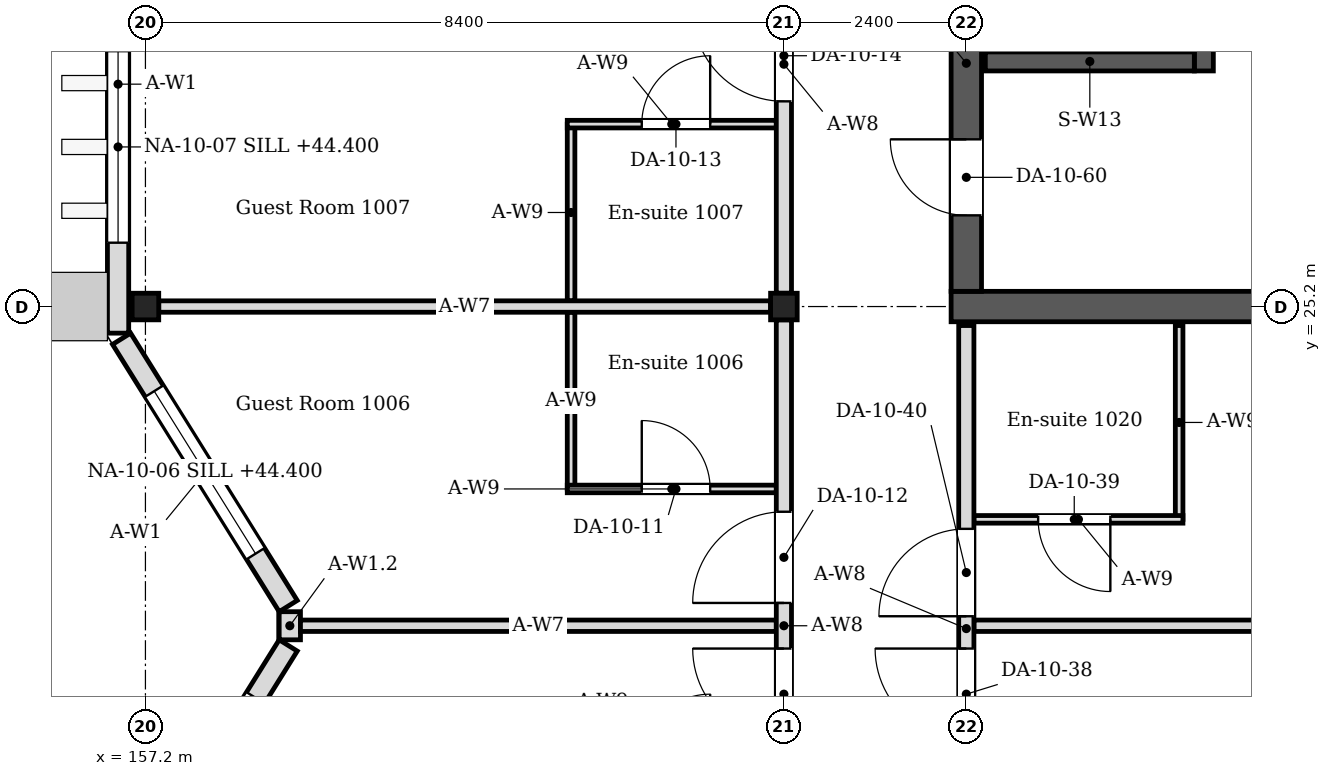
"""IFC4 building model, lengths in metres.
Left out: names, types, materials, properties, quantities, classifications, styles, units other than length and angle.
Written with IfcOpenShell. Run it as: python <this file> out.ifc"""

import sys

from ifc_helpers import new_model, si_unit, direction, frame, frame_2d, origin, origin_2d, place, context, subcontext, project, spatial, rectangle, i_section, extrude, element, fill, save


model = new_model("IFC4")
c1 = context("Model", 3, precision=1e-05, world=origin(), true_north=direction((0.0, 1.0)))
c2 = subcontext(c1, "Body", "Model", "MODEL_VIEW")
j1 = project(units=[si_unit("LENGTHUNIT", "METRE"), si_unit("PLANEANGLEUNIT", "RADIAN")], contexts=[c1])
p1 = place(None, origin())
s1 = spatial("IfcSite", under=j1, at=p1, CompositionType="ELEMENT")
p2 = place(p1, origin())
s2 = spatial("IfcBuilding", under=s1, at=p2, CompositionType="ELEMENT")
p3 = place(p2, frame((0.0, 0.0, 43.8)))
s3 = spatial("IfcBuildingStorey", under=s2, at=p3, CompositionType="ELEMENT", Elevation=43.8)
for number, where, z_axis, x_axis in (
    (1, (157.2, 25.2, 0.0), (0.0, 0.0, 1.0), (1.0, 0.0, 0.0)),
    (2, (165.6, 25.2, 0.0), (0.0, 0.0, 1.0), (1.0, 0.0, 0.0)),
):
    element("IfcColumn", number, at=place(p3, frame(where, z_axis=z_axis, x_axis=x_axis)), inside=s3, PredefinedType="COLUMN", context=c2, shape_type="SweptSolid", body=[
        extrude(i_section(OverallWidth=0.35, OverallDepth=0.35, WebThickness=0.012, FlangeThickness=0.019, FilletRadius=0.013, at=origin_2d()), origin(), (0.0, 0.0, 1.0), 4.2),
    ])
p4 = place(p3, frame((167.8, 25.2, 0.0), z_axis=(0.0, 0.0, 1.0), x_axis=(1.0, 0.0, 0.0)))
e3 = element("IfcWall", 3, at=p4, inside=s3, PredefinedType="SOLIDWALL", context=c2, shape_type="SweptSolid", body=[
    extrude(rectangle(XDim=8.8, YDim=0.4, at=frame_2d((4.4, 0.0))), origin(), (0.0, 0.0, 1.0), 4.05),
])
p5 = place(p3, frame((168.0, 25.4, 0.0), z_axis=(0.0, 0.0, 1.0), x_axis=(0.0, 1.0, 0.0)))
e4 = element("IfcWall", 4, at=p5, inside=s3, PredefinedType="SOLIDWALL", context=c2, shape_type="SweptSolid", body=[
    extrude(rectangle(XDim=16.4, YDim=0.4, at=frame_2d((8.2, 0.0))), origin(), (0.0, 0.0, 1.0), 4.05),
])
p6 = place(p5, frame((1.0, 0.0, 0.0)))
e5 = element("IfcOpeningElement", 5, at=p6, cuts=e4, PredefinedType="OPENING", context=c2, shape_type="SweptSolid", body=[
    extrude(rectangle(XDim=1.0, YDim=2.1, at=frame_2d((0.5, 1.05))), frame((0.0, 0.21, 0.0), z_axis=(0.0, -1.0, 0.0), x_axis=(1.0, 0.0, 0.0)), (0.0, 0.0, 1.0), 0.42),
])
p7 = place(p5, frame((14.4, 0.0, 0.0)))
e6 = element("IfcOpeningElement", 6, at=p7, cuts=e4, PredefinedType="OPENING", context=c2, shape_type="SweptSolid", body=[
    extrude(rectangle(XDim=1.4, YDim=2.1, at=frame_2d((0.7, 1.05))), frame((0.0, 0.21, 0.0), z_axis=(0.0, -1.0, 0.0), x_axis=(1.0, 0.0, 0.0)), (0.0, 0.0, 1.0), 0.42),
])
p8 = place(p3, frame((156.886, 17.224, 0.0), z_axis=(0.0, 0.0, 1.0), x_axis=(0.529018946142, 0.848610013271, 0.0)))
e7 = element("IfcWall", 7, at=p8, inside=s3, PredefinedType="SOLIDWALL", context=c2, shape_type="SweptSolid", body=[
    extrude(rectangle(XDim=4.144, YDim=0.28, at=frame_2d((2.072, 0.0))), origin(), (0.0, 0.0, 1.0), 4.05),
])
p9 = place(p8, frame((0.812, 0.0, 0.6)))
e8 = element("IfcOpeningElement", 8, at=p9, cuts=e7, PredefinedType="OPENING", context=c2, shape_type="SweptSolid", body=[
    extrude(rectangle(XDim=2.52, YDim=2.4, at=frame_2d((1.26, 1.2))), frame((0.0, 0.15, 0.0), z_axis=(0.0, -1.0, 0.0), x_axis=(1.0, 0.0, 0.0)), (0.0, 0.0, 1.0), 0.3),
])
p10 = place(p3, frame((159.079, 21.259, 0.0), z_axis=(0.0, 0.0, 1.0), x_axis=(-0.529018946142, 0.848610013271, 0.0)))
e9 = element("IfcWall", 9, at=p10, inside=s3, PredefinedType="SOLIDWALL", context=c2, shape_type="SweptSolid", body=[
    extrude(rectangle(XDim=4.144, YDim=0.28, at=frame_2d((2.072, 0.0))), origin(), (0.0, 0.0, 1.0), 4.05),
])
p11 = place(p10, frame((0.812, 0.0, 0.6)))
e10 = element("IfcOpeningElement", 10, at=p11, cuts=e9, PredefinedType="OPENING", context=c2, shape_type="SweptSolid", body=[
    extrude(rectangle(XDim=2.52, YDim=2.4, at=frame_2d((1.26, 1.2))), frame((0.0, 0.15, 0.0), z_axis=(0.0, -1.0, 0.0), x_axis=(1.0, 0.0, 0.0)), (0.0, 0.0, 1.0), 0.3),
])
p12 = place(p3, frame((159.1, 20.815, 0.0), z_axis=(0.0, 0.0, 1.0), x_axis=(0.0, 1.0, 0.0)))
e11 = element("IfcWall", 11, at=p12, inside=s3, PredefinedType="SOLIDWALL", context=c2, shape_type="SweptSolid", body=[
    extrude(rectangle(XDim=0.37, YDim=0.28, at=frame_2d((0.185, 0.0))), origin(), (0.0, 0.0, 1.0), 3.604),
])
p13 = place(p3, frame((156.84, 24.85, 0.0), z_axis=(0.0, 0.0, 1.0), x_axis=(0.0, 1.0, 0.0)))
e12 = element("IfcWall", 12, at=p13, inside=s3, PredefinedType="SOLIDWALL", context=c2, shape_type="SweptSolid", body=[
    extrude(rectangle(XDim=9.1, YDim=0.28, at=frame_2d((4.55, 0.0))), origin(), (0.0, 0.0, 1.0), 4.05),
])
p14 = place(p13, frame((1.19, 0.0, 0.6)))
e13 = element("IfcOpeningElement", 13, at=p14, cuts=e12, PredefinedType="OPENING", context=c2, shape_type="SweptSolid", body=[
    extrude(rectangle(XDim=2.52, YDim=2.4, at=frame_2d((1.26, 1.2))), frame((0.0, 0.15, 0.0), z_axis=(0.0, -1.0, 0.0), x_axis=(1.0, 0.0, 0.0)), (0.0, 0.0, 1.0), 0.3),
])
p15 = place(p13, frame((5.39, 0.0, 0.6)))
e14 = element("IfcOpeningElement", 14, at=p15, cuts=e12, PredefinedType="OPENING", context=c2, shape_type="SweptSolid", body=[
    extrude(rectangle(XDim=2.52, YDim=2.4, at=frame_2d((1.26, 1.2))), frame((0.0, 0.15, 0.0), z_axis=(0.0, -1.0, 0.0), x_axis=(1.0, 0.0, 0.0)), (0.0, 0.0, 1.0), 0.3),
])
p16 = place(p3, frame((162.8, 22.8, 0.0), z_axis=(0.0, 0.0, 1.0), x_axis=(0.0, 1.0, 0.0)))
e15 = element("IfcWall", 15, at=p16, inside=s3, PredefinedType="PARTITIONING", context=c2, shape_type="SweptSolid", body=[
    extrude(rectangle(XDim=2.325, YDim=0.1, at=frame_2d((1.163, 0.0))), origin(), (0.0, 0.0, 1.0), 4.05),
])
p17 = place(p3, frame((162.75, 22.8, 0.0), z_axis=(0.0, 0.0, 1.0), x_axis=(1.0, 0.0, 0.0)))
e16 = element("IfcWall", 16, at=p17, inside=s3, PredefinedType="PARTITIONING", context=c2, shape_type="SweptSolid", body=[
    extrude(rectangle(XDim=2.75, YDim=0.1, at=frame_2d((1.375, 0.0))), origin(), (0.0, 0.0, 1.0), 4.05),
])
p18 = place(p17, frame((0.98, 0.0, 0.0)))
e17 = element("IfcOpeningElement", 17, at=p18, cuts=e16, PredefinedType="OPENING", context=c2, shape_type="SweptSolid", body=[
    extrude(rectangle(XDim=0.9, YDim=2.1, at=frame_2d((0.45, 1.05))), frame((0.0, 0.06, 0.0), z_axis=(0.0, -1.0, 0.0), x_axis=(1.0, 0.0, 0.0)), (0.0, 0.0, 1.0), 0.12),
])
p19 = place(p3, frame((162.8, 25.275, 0.0), z_axis=(0.0, 0.0, 1.0), x_axis=(0.0, 1.0, 0.0)))
e18 = element("IfcWall", 18, at=p19, inside=s3, PredefinedType="PARTITIONING", context=c2, shape_type="SweptSolid", body=[
    extrude(rectangle(XDim=2.325, YDim=0.1, at=frame_2d((1.163, 0.0))), origin(), (0.0, 0.0, 1.0), 4.05),
])
p20 = place(p3, frame((162.75, 27.6, 0.0), z_axis=(0.0, 0.0, 1.0), x_axis=(1.0, 0.0, 0.0)))
e19 = element("IfcWall", 19, at=p20, inside=s3, PredefinedType="PARTITIONING", context=c2, shape_type="SweptSolid", body=[
    extrude(rectangle(XDim=2.75, YDim=0.1, at=frame_2d((1.375, 0.0))), origin(), (0.0, 0.0, 1.0), 4.05),
])
p21 = place(p20, frame((0.98, 0.0, 0.0)))
e20 = element("IfcOpeningElement", 20, at=p21, cuts=e19, PredefinedType="OPENING", context=c2, shape_type="SweptSolid", body=[
    extrude(rectangle(XDim=0.9, YDim=2.1, at=frame_2d((0.45, 1.05))), frame((0.0, 0.06, 0.0), z_axis=(0.0, -1.0, 0.0), x_axis=(1.0, 0.0, 0.0)), (0.0, 0.0, 1.0), 0.12),
])
p22 = place(p3, frame((170.8, 22.4, 0.0), z_axis=(0.0, 0.0, 1.0), x_axis=(0.0, 1.0, 0.0)))
e21 = element("IfcWall", 21, at=p22, inside=s3, PredefinedType="PARTITIONING", context=c2, shape_type="SweptSolid", body=[
    extrude(rectangle(XDim=2.55, YDim=0.1, at=frame_2d((1.275, 0.0))), origin(), (0.0, 0.0, 1.0), 4.05),
])
p23 = place(p3, frame((170.85, 22.4, 0.0), z_axis=(0.0, 0.0, 1.0), x_axis=(-1.0, 0.0, 0.0)))
e22 = element("IfcWall", 22, at=p23, inside=s3, PredefinedType="PARTITIONING", context=c2, shape_type="SweptSolid", body=[
    extrude(rectangle(XDim=2.75, YDim=0.1, at=frame_2d((1.375, 0.0))), origin(), (0.0, 0.0, 1.0), 4.05),
])
p24 = place(p23, frame((0.955, 0.0, 0.0)))
e23 = element("IfcOpeningElement", 23, at=p24, cuts=e22, PredefinedType="OPENING", context=c2, shape_type="SweptSolid", body=[
    extrude(rectangle(XDim=0.95, YDim=2.1, at=frame_2d((0.475, 1.05))), frame((0.0, 0.06, 0.0), z_axis=(0.0, -1.0, 0.0), x_axis=(1.0, 0.0, 0.0)), (0.0, 0.0, 1.0), 0.12),
])
p25 = place(p3, frame((157.375, 25.2, 0.0), z_axis=(0.0, 0.0, 1.0), x_axis=(1.0, 0.0, 0.0)))
e24 = element("IfcWall", 24, at=p25, inside=s3, PredefinedType="PARTITIONING", context=c2, shape_type="SweptSolid", body=[
    extrude(rectangle(XDim=8.05, YDim=0.15, at=frame_2d((4.025, 0.0))), origin(), (0.0, 0.0, 1.0), 3.604),
])
p26 = place(p3, frame((159.24, 21.0, 0.0), z_axis=(0.0, 0.0, 1.0), x_axis=(1.0, 0.0, 0.0)))
e25 = element("IfcWall", 25, at=p26, inside=s3, PredefinedType="PARTITIONING", context=c2, shape_type="SweptSolid", body=[
    extrude(rectangle(XDim=6.26, YDim=0.15, at=frame_2d((3.13, 0.0))), origin(), (0.0, 0.0, 1.0), 3.604),
])
p27 = place(p3, frame((168.1, 21.0, 0.0), z_axis=(0.0, 0.0, 1.0), x_axis=(1.0, 0.0, 0.0)))
e26 = element("IfcWall", 26, at=p27, inside=s3, PredefinedType="PARTITIONING", context=c2, shape_type="SweptSolid", body=[
    extrude(rectangle(XDim=8.52, YDim=0.15, at=frame_2d((4.26, 0.0))), origin(), (0.0, 0.0, 1.0), 3.604),
])
p28 = place(p3, frame((165.6, 16.975, 0.0), z_axis=(0.0, 0.0, 1.0), x_axis=(0.0, 1.0, 0.0)))
e27 = element("IfcWall", 27, at=p28, inside=s3, PredefinedType="PARTITIONING", context=c2, shape_type="SweptSolid", body=[
    extrude(rectangle(XDim=8.05, YDim=0.2, at=frame_2d((4.025, 0.0))), origin(), (0.0, 0.0, 1.0), 3.45),
])
p29 = place(p28, frame((2.525, 0.0, 0.0)))
e28 = element("IfcOpeningElement", 28, at=p29, cuts=e27, PredefinedType="OPENING", context=c2, shape_type="SweptSolid", body=[
    extrude(rectangle(XDim=1.2, YDim=2.1, at=frame_2d((0.6, 1.05))), frame((0.0, 0.11, 0.0), z_axis=(0.0, -1.0, 0.0), x_axis=(1.0, 0.0, 0.0)), (0.0, 0.0, 1.0), 0.22),
])
p30 = place(p28, frame((4.325, 0.0, 0.0)))
e29 = element("IfcOpeningElement", 29, at=p30, cuts=e27, PredefinedType="OPENING", context=c2, shape_type="SweptSolid", body=[
    extrude(rectangle(XDim=1.2, YDim=2.1, at=frame_2d((0.6, 1.05))), frame((0.0, 0.11, 0.0), z_axis=(0.0, -1.0, 0.0), x_axis=(1.0, 0.0, 0.0)), (0.0, 0.0, 1.0), 0.22),
])
p31 = place(p3, frame((165.6, 25.375, 0.0), z_axis=(0.0, 0.0, 1.0), x_axis=(0.0, 1.0, 0.0)))
e30 = element("IfcWall", 30, at=p31, inside=s3, PredefinedType="PARTITIONING", context=c2, shape_type="SweptSolid", body=[
    extrude(rectangle(XDim=8.05, YDim=0.2, at=frame_2d((4.025, 0.0))), origin(), (0.0, 0.0, 1.0), 3.45),
])
p32 = place(p31, frame((2.525, 0.0, 0.0)))
e31 = element("IfcOpeningElement", 31, at=p32, cuts=e30, PredefinedType="OPENING", context=c2, shape_type="SweptSolid", body=[
    extrude(rectangle(XDim=1.2, YDim=2.1, at=frame_2d((0.6, 1.05))), frame((0.0, 0.11, 0.0), z_axis=(0.0, -1.0, 0.0), x_axis=(1.0, 0.0, 0.0)), (0.0, 0.0, 1.0), 0.22),
])
p33 = place(p31, frame((4.325, 0.0, 0.0)))
e32 = element("IfcOpeningElement", 32, at=p33, cuts=e30, PredefinedType="OPENING", context=c2, shape_type="SweptSolid", body=[
    extrude(rectangle(XDim=1.2, YDim=2.1, at=frame_2d((0.6, 1.05))), frame((0.0, 0.11, 0.0), z_axis=(0.0, -1.0, 0.0), x_axis=(1.0, 0.0, 0.0)), (0.0, 0.0, 1.0), 0.22),
])
p34 = place(p3, frame((168.0, 16.975, 0.0), z_axis=(0.0, 0.0, 1.0), x_axis=(0.0, 1.0, 0.0)))
e33 = element("IfcWall", 33, at=p34, inside=s3, PredefinedType="PARTITIONING", context=c2, shape_type="SweptSolid", body=[
    extrude(rectangle(XDim=7.975, YDim=0.2, at=frame_2d((3.987, 0.0))), origin(), (0.0, 0.0, 1.0), 3.45),
])
p35 = place(p34, frame((2.525, 0.0, 0.0)))
e34 = element("IfcOpeningElement", 34, at=p35, cuts=e33, PredefinedType="OPENING", context=c2, shape_type="SweptSolid", body=[
    extrude(rectangle(XDim=1.2, YDim=2.1, at=frame_2d((0.6, 1.05))), frame((0.0, 0.11, 0.0), z_axis=(0.0, -1.0, 0.0), x_axis=(1.0, 0.0, 0.0)), (0.0, 0.0, 1.0), 0.22),
])
p36 = place(p34, frame((4.15, 0.0, 0.0)))
e35 = element("IfcOpeningElement", 35, at=p36, cuts=e33, PredefinedType="OPENING", context=c2, shape_type="SweptSolid", body=[
    extrude(rectangle(XDim=1.15, YDim=2.1, at=frame_2d((0.575, 1.05))), frame((0.0, 0.11, 0.0), z_axis=(0.0, -1.0, 0.0), x_axis=(1.0, 0.0, 0.0)), (0.0, 0.0, 1.0), 0.22),
])
p37 = place(p3, frame((171.125, 28.3, 0.0), z_axis=(0.0, 0.0, 1.0), x_axis=(0.0, 1.0, 0.0)))
e36 = element("IfcWall", 36, at=p37, inside=s3, PredefinedType="SOLIDWALL", context=c2, shape_type="SweptSolid", body=[
    extrude(rectangle(XDim=10.9, YDim=0.25, at=frame_2d((5.45, 0.0))), origin(), (0.0, 0.0, 1.0), 4.05),
])
p38 = place(p37, frame((0.8, 0.0, 0.0)))
e37 = element("IfcOpeningElement", 37, at=p38, cuts=e36, PredefinedType="OPENING", context=c2, shape_type="SweptSolid", body=[
    extrude(rectangle(XDim=1.1, YDim=2.1, at=frame_2d((0.55, 1.05))), frame((0.0, 0.135, 0.0), z_axis=(0.0, -1.0, 0.0), x_axis=(1.0, 0.0, 0.0)), (0.0, 0.0, 1.0), 0.27),
])
p39 = place(p37, frame((3.05, 0.0, 0.0)))
e38 = element("IfcOpeningElement", 38, at=p39, cuts=e36, PredefinedType="OPENING", context=c2, shape_type="SweptSolid", body=[
    extrude(rectangle(XDim=1.1, YDim=2.1, at=frame_2d((0.55, 1.05))), frame((0.0, 0.135, 0.0), z_axis=(0.0, -1.0, 0.0), x_axis=(1.0, 0.0, 0.0)), (0.0, 0.0, 1.0), 0.27),
])
p40 = place(p37, frame((5.1, 0.0, 0.0)))
e39 = element("IfcOpeningElement", 39, at=p40, cuts=e36, PredefinedType="OPENING", context=c2, shape_type="SweptSolid", body=[
    extrude(rectangle(XDim=1.1, YDim=2.1, at=frame_2d((0.55, 1.05))), frame((0.0, 0.135, 0.0), z_axis=(0.0, -1.0, 0.0), x_axis=(1.0, 0.0, 0.0)), (0.0, 0.0, 1.0), 0.27),
])
p41 = place(p37, frame((7.15, 0.0, 0.0)))
e40 = element("IfcOpeningElement", 40, at=p41, cuts=e36, PredefinedType="OPENING", context=c2, shape_type="SweptSolid", body=[
    extrude(rectangle(XDim=1.1, YDim=2.1, at=frame_2d((0.55, 1.05))), frame((0.0, 0.135, 0.0), z_axis=(0.0, -1.0, 0.0), x_axis=(1.0, 0.0, 0.0)), (0.0, 0.0, 1.0), 0.27),
])
p42 = place(p37, frame((9.2, 0.0, 0.0)))
e41 = element("IfcOpeningElement", 41, at=p42, cuts=e36, PredefinedType="OPENING", context=c2, shape_type="SweptSolid", body=[
    extrude(rectangle(XDim=1.1, YDim=2.1, at=frame_2d((0.55, 1.05))), frame((0.0, 0.135, 0.0), z_axis=(0.0, -1.0, 0.0), x_axis=(1.0, 0.0, 0.0)), (0.0, 0.0, 1.0), 0.27),
])
p43 = place(p3, frame((168.25, 28.425, 0.0), z_axis=(0.0, 0.0, 1.0), x_axis=(1.0, 0.0, 0.0)))
e42 = element("IfcWall", 42, at=p43, inside=s3, PredefinedType="SOLIDWALL", context=c2, shape_type="SweptSolid", body=[
    extrude(rectangle(XDim=2.75, YDim=0.25, at=frame_2d((1.375, 0.0))), origin(), (0.0, 0.0, 1.0), 4.05),
])
p44 = place(p11, origin())
e43 = element("IfcWindow", 43, at=p44, inside=s3, PartitioningType="SINGLE_PANEL", PredefinedType="WINDOW", context=c2, shape_type="SweptSolid", body=[
    extrude(rectangle(XDim=2.52, YDim=2.4, at=frame_2d((1.26, 1.2))), frame((0.0, 0.03, 0.0), z_axis=(0.0, -1.0, 0.0), x_axis=(1.0, 0.0, 0.0)), (0.0, 0.0, 1.0), 0.06),
])
fill(e10, e43)
p45 = place(p14, origin())
e44 = element("IfcWindow", 44, at=p45, inside=s3, PartitioningType="SINGLE_PANEL", PredefinedType="WINDOW", context=c2, shape_type="SweptSolid", body=[
    extrude(rectangle(XDim=2.52, YDim=2.4, at=frame_2d((1.26, 1.2))), frame((0.0, 0.03, 0.0), z_axis=(0.0, -1.0, 0.0), x_axis=(1.0, 0.0, 0.0)), (0.0, 0.0, 1.0), 0.06),
])
fill(e13, e44)
p46 = place(p29, origin())
e45 = element("IfcDoor", 45, at=p46, inside=s3, OperationType="SINGLE_SWING_RIGHT", PredefinedType="DOOR", context=c2, shape_type="SweptSolid", body=[
    extrude(rectangle(XDim=1.2, YDim=2.1, at=frame_2d((0.6, 1.05))), frame((0.0, 0.025, 0.0), z_axis=(0.0, -1.0, 0.0), x_axis=(1.0, 0.0, 0.0)), (0.0, 0.0, 1.0), 0.05),
])
fill(e28, e45)
p47 = place(p18, origin())
e46 = element("IfcDoor", 46, at=p47, inside=s3, OperationType="SINGLE_SWING_LEFT", PredefinedType="DOOR", context=c2, shape_type="SweptSolid", body=[
    extrude(rectangle(XDim=0.9, YDim=2.1, at=frame_2d((0.45, 1.05))), frame((0.0, 0.025, 0.0), z_axis=(0.0, -1.0, 0.0), x_axis=(1.0, 0.0, 0.0)), (0.0, 0.0, 1.0), 0.05),
])
fill(e17, e46)
p48 = place(p30, origin())
e47 = element("IfcDoor", 47, at=p48, inside=s3, OperationType="SINGLE_SWING_LEFT", PredefinedType="DOOR", context=c2, shape_type="SweptSolid", body=[
    extrude(rectangle(XDim=1.2, YDim=2.1, at=frame_2d((0.6, 1.05))), frame((0.0, 0.025, 0.0), z_axis=(0.0, -1.0, 0.0), x_axis=(1.0, 0.0, 0.0)), (0.0, 0.0, 1.0), 0.05),
])
fill(e29, e47)
p49 = place(p21, origin())
e48 = element("IfcDoor", 48, at=p49, inside=s3, OperationType="SINGLE_SWING_RIGHT", PredefinedType="DOOR", context=c2, shape_type="SweptSolid", body=[
    extrude(rectangle(XDim=0.9, YDim=2.1, at=frame_2d((0.45, 1.05))), frame((0.0, 0.025, 0.0), z_axis=(0.0, -1.0, 0.0), x_axis=(1.0, 0.0, 0.0)), (0.0, 0.0, 1.0), 0.05),
])
fill(e20, e48)
p50 = place(p32, origin())
e49 = element("IfcDoor", 49, at=p50, inside=s3, OperationType="SINGLE_SWING_RIGHT", PredefinedType="DOOR", context=c2, shape_type="SweptSolid", body=[
    extrude(rectangle(XDim=1.2, YDim=2.1, at=frame_2d((0.6, 1.05))), frame((0.0, 0.025, 0.0), z_axis=(0.0, -1.0, 0.0), x_axis=(1.0, 0.0, 0.0)), (0.0, 0.0, 1.0), 0.05),
])
fill(e31, e49)
p51 = place(p35, origin())
e50 = element("IfcDoor", 50, at=p51, inside=s3, OperationType="SINGLE_SWING_RIGHT", PredefinedType="DOOR", context=c2, shape_type="SweptSolid", body=[
    extrude(rectangle(XDim=1.2, YDim=2.1, at=frame_2d((0.6, 1.05))), frame((0.0, 0.025, 0.0), z_axis=(0.0, -1.0, 0.0), x_axis=(1.0, 0.0, 0.0)), (0.0, 0.0, 1.0), 0.05),
])
fill(e34, e50)
p52 = place(p24, origin())
e51 = element("IfcDoor", 51, at=p52, inside=s3, OperationType="SINGLE_SWING_LEFT", PredefinedType="DOOR", context=c2, shape_type="SweptSolid", body=[
    extrude(rectangle(XDim=0.95, YDim=2.1, at=frame_2d((0.475, 1.05))), frame((0.0, 0.025, 0.0), z_axis=(0.0, -1.0, 0.0), x_axis=(1.0, 0.0, 0.0)), (0.0, 0.0, 1.0), 0.05),
])
fill(e23, e51)
p53 = place(p36, origin())
e52 = element("IfcDoor", 52, at=p53, inside=s3, OperationType="SINGLE_SWING_LEFT", PredefinedType="DOOR", context=c2, shape_type="SweptSolid", body=[
    extrude(rectangle(XDim=1.15, YDim=2.1, at=frame_2d((0.575, 1.05))), frame((0.0, 0.025, 0.0), z_axis=(0.0, -1.0, 0.0), x_axis=(1.0, 0.0, 0.0)), (0.0, 0.0, 1.0), 0.05),
])
fill(e35, e52)
p54 = place(p6, origin())
e53 = element("IfcDoor", 53, at=p54, inside=s3, OperationType="SINGLE_SWING_RIGHT", PredefinedType="DOOR", context=c2, shape_type="SweptSolid", body=[
    extrude(rectangle(XDim=1.0, YDim=2.1, at=frame_2d((0.5, 1.05))), frame((0.0, 0.025, 0.0), z_axis=(0.0, -1.0, 0.0), x_axis=(1.0, 0.0, 0.0)), (0.0, 0.0, 1.0), 0.05),
])
fill(e5, e53)
save(model, sys.argv[1])
